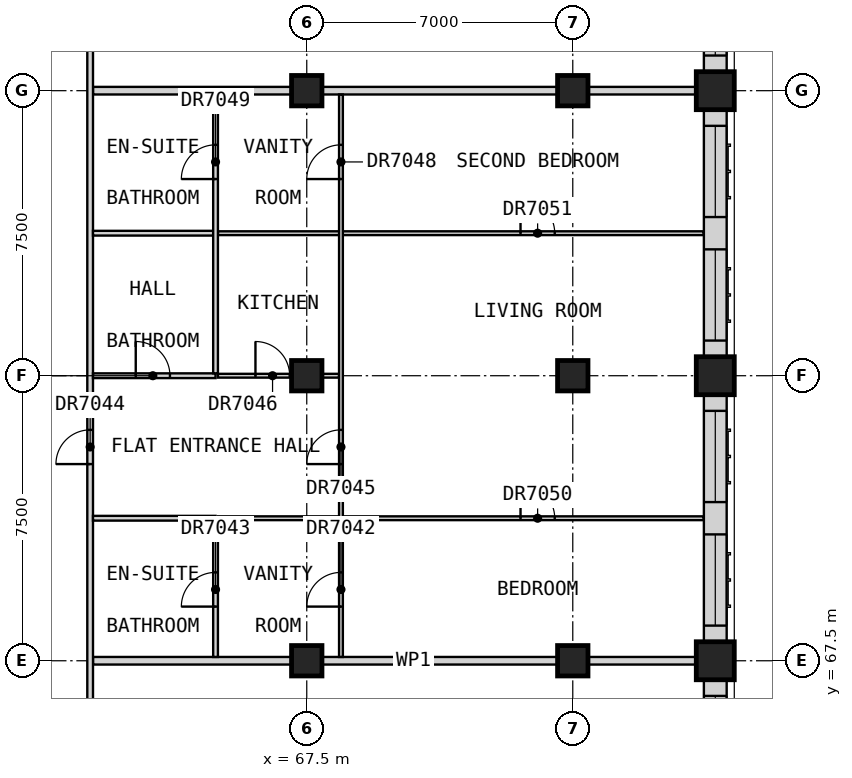
"""IFC4 building model, lengths in metres.
Left out: names, types, materials, properties, quantities, classifications, styles, units other than length and angle.
Written with IfcOpenShell. Run it as: python <this file> out.ifc"""

import sys

from ifc_helpers import new_model, si_unit, direction, frame, frame_2d, origin, origin_2d, place, context, subcontext, project, spatial, rectangle, extrude, element, fill, save


model = new_model("IFC4")
c1 = context("Model", 3, precision=1e-05, world=origin(), true_north=direction((0.0, 1.0)))
c2 = subcontext(c1, "Body", "Model", "MODEL_VIEW")
j1 = project(units=[si_unit("LENGTHUNIT", "METRE"), si_unit("PLANEANGLEUNIT", "RADIAN")], contexts=[c1])
p1 = place(None, origin())
s1 = spatial("IfcSite", under=j1, at=p1, CompositionType="ELEMENT")
p2 = place(p1, origin())
s2 = spatial("IfcBuilding", under=s1, at=p2, CompositionType="ELEMENT")
p3 = place(p2, frame((0.0, 0.0, 230.2)))
s3 = spatial("IfcBuildingStorey", under=s2, at=p3, CompositionType="ELEMENT", Elevation=230.2)
for number, where, z_axis, x_axis in (
    (1, (78.25, 67.5, 0.0), (0.0, 0.0, 1.0), (1.0, 0.0, 0.0)),
    (2, (78.25, 75.0, 0.0), (0.0, 0.0, 1.0), (1.0, 0.0, 0.0)),
    (3, (78.25, 82.5, 0.0), (0.0, 0.0, 1.0), (1.0, 0.0, 0.0)),
):
    element("IfcColumn", number, at=place(p3, frame(where, z_axis=z_axis, x_axis=x_axis)), inside=s3, PredefinedType="COLUMN", context=c2, shape_type="SweptSolid", body=[
        extrude(rectangle(XDim=1.0, YDim=1.0, at=origin_2d()), origin(), (0.0, 0.0, 1.0), 3.5),
    ])
for number, where, z_axis, x_axis in (
    (4, (67.5, 67.5, 0.0), (0.0, 0.0, 1.0), (1.0, 0.0, 0.0)),
    (5, (67.5, 75.0, 0.0), (0.0, 0.0, 1.0), (1.0, 0.0, 0.0)),
    (6, (67.5, 82.5, 0.0), (0.0, 0.0, 1.0), (1.0, 0.0, 0.0)),
    (7, (74.5, 67.5, 0.0), (0.0, 0.0, 1.0), (1.0, 0.0, 0.0)),
    (8, (74.5, 75.0, 0.0), (0.0, 0.0, 1.0), (1.0, 0.0, 0.0)),
    (9, (74.5, 82.5, 0.0), (0.0, 0.0, 1.0), (1.0, 0.0, 0.0)),
):
    element("IfcColumn", number, at=place(p3, frame(where, z_axis=z_axis, x_axis=x_axis)), inside=s3, PredefinedType="COLUMN", context=c2, shape_type="SweptSolid", body=[
        extrude(rectangle(XDim=0.8, YDim=0.8, at=origin_2d()), origin(), (0.0, 0.0, 1.0), 3.5),
    ])
p4 = place(p3, frame((78.25, 60.5, 0.0), z_axis=(0.0, 0.0, 1.0), x_axis=(0.0, 1.0, 0.0)))
e10 = element("IfcWall", 10, at=p4, inside=s3, PredefinedType="SOLIDWALL", context=c2, shape_type="SweptSolid", body=[
    extrude(rectangle(XDim=6.5, YDim=0.6, at=frame_2d((3.25, 0.0))), origin(), (0.0, 0.0, 1.0), 2.75),
])
p5 = place(p4, frame((0.425, 0.0, 0.8)))
e11 = element("IfcOpeningElement", 11, at=p5, cuts=e10, PredefinedType="OPENING", context=c2, shape_type="SweptSolid", body=[
    extrude(rectangle(XDim=2.4, YDim=1.8, at=frame_2d((1.2, 0.9))), frame((0.0, 0.31, 0.0), z_axis=(0.0, -1.0, 0.0), x_axis=(1.0, 0.0, 0.0)), (0.0, 0.0, 1.0), 0.62),
])
p6 = place(p4, frame((3.675, 0.0, 0.8)))
e12 = element("IfcOpeningElement", 12, at=p6, cuts=e10, PredefinedType="OPENING", context=c2, shape_type="SweptSolid", body=[
    extrude(rectangle(XDim=2.4, YDim=1.8, at=frame_2d((1.2, 0.9))), frame((0.0, 0.31, 0.0), z_axis=(0.0, -1.0, 0.0), x_axis=(1.0, 0.0, 0.0)), (0.0, 0.0, 1.0), 0.62),
])
p7 = place(p3, frame((78.25, 68.0, 0.0), z_axis=(0.0, 0.0, 1.0), x_axis=(0.0, 1.0, 0.0)))
e13 = element("IfcWall", 13, at=p7, inside=s3, PredefinedType="SOLIDWALL", context=c2, shape_type="SweptSolid", body=[
    extrude(rectangle(XDim=6.5, YDim=0.6, at=frame_2d((3.25, 0.0))), origin(), (0.0, 0.0, 1.0), 2.75),
])
p8 = place(p7, frame((0.425, 0.0, 0.8)))
e14 = element("IfcOpeningElement", 14, at=p8, cuts=e13, PredefinedType="OPENING", context=c2, shape_type="SweptSolid", body=[
    extrude(rectangle(XDim=2.4, YDim=1.8, at=frame_2d((1.2, 0.9))), frame((0.0, 0.31, 0.0), z_axis=(0.0, -1.0, 0.0), x_axis=(1.0, 0.0, 0.0)), (0.0, 0.0, 1.0), 0.62),
])
p9 = place(p7, frame((3.675, 0.0, 0.8)))
e15 = element("IfcOpeningElement", 15, at=p9, cuts=e13, PredefinedType="OPENING", context=c2, shape_type="SweptSolid", body=[
    extrude(rectangle(XDim=2.4, YDim=1.8, at=frame_2d((1.2, 0.9))), frame((0.0, 0.31, 0.0), z_axis=(0.0, -1.0, 0.0), x_axis=(1.0, 0.0, 0.0)), (0.0, 0.0, 1.0), 0.62),
])
p10 = place(p3, frame((78.25, 75.5, 0.0), z_axis=(0.0, 0.0, 1.0), x_axis=(0.0, 1.0, 0.0)))
e16 = element("IfcWall", 16, at=p10, inside=s3, PredefinedType="SOLIDWALL", context=c2, shape_type="SweptSolid", body=[
    extrude(rectangle(XDim=6.5, YDim=0.6, at=frame_2d((3.25, 0.0))), origin(), (0.0, 0.0, 1.0), 2.75),
])
p11 = place(p10, frame((0.425, 0.0, 0.8)))
e17 = element("IfcOpeningElement", 17, at=p11, cuts=e16, PredefinedType="OPENING", context=c2, shape_type="SweptSolid", body=[
    extrude(rectangle(XDim=2.4, YDim=1.8, at=frame_2d((1.2, 0.9))), frame((0.0, 0.31, 0.0), z_axis=(0.0, -1.0, 0.0), x_axis=(1.0, 0.0, 0.0)), (0.0, 0.0, 1.0), 0.62),
])
p12 = place(p10, frame((3.675, 0.0, 0.8)))
e18 = element("IfcOpeningElement", 18, at=p12, cuts=e16, PredefinedType="OPENING", context=c2, shape_type="SweptSolid", body=[
    extrude(rectangle(XDim=2.4, YDim=1.8, at=frame_2d((1.2, 0.9))), frame((0.0, 0.31, 0.0), z_axis=(0.0, -1.0, 0.0), x_axis=(1.0, 0.0, 0.0)), (0.0, 0.0, 1.0), 0.62),
])
p13 = place(p3, frame((78.25, 83.0, 0.0), z_axis=(0.0, 0.0, 1.0), x_axis=(0.0, 1.0, 0.0)))
e19 = element("IfcWall", 19, at=p13, inside=s3, PredefinedType="SOLIDWALL", context=c2, shape_type="SweptSolid", body=[
    extrude(rectangle(XDim=6.5, YDim=0.6, at=frame_2d((3.25, 0.0))), origin(), (0.0, 0.0, 1.0), 2.75),
])
p14 = place(p13, frame((0.425, 0.0, 0.8)))
e20 = element("IfcOpeningElement", 20, at=p14, cuts=e19, PredefinedType="OPENING", context=c2, shape_type="SweptSolid", body=[
    extrude(rectangle(XDim=2.4, YDim=1.8, at=frame_2d((1.2, 0.9))), frame((0.0, 0.31, 0.0), z_axis=(0.0, -1.0, 0.0), x_axis=(1.0, 0.0, 0.0)), (0.0, 0.0, 1.0), 0.62),
])
p15 = place(p13, frame((3.675, 0.0, 0.8)))
e21 = element("IfcOpeningElement", 21, at=p15, cuts=e19, PredefinedType="OPENING", context=c2, shape_type="SweptSolid", body=[
    extrude(rectangle(XDim=2.4, YDim=1.8, at=frame_2d((1.2, 0.9))), frame((0.0, 0.31, 0.0), z_axis=(0.0, -1.0, 0.0), x_axis=(1.0, 0.0, 0.0)), (0.0, 0.0, 1.0), 0.62),
])
for number, where, z_axis, x_axis in (
    (22, (61.875, 67.5, 0.0), (0.0, 0.0, 1.0), (1.0, 0.0, 0.0)),
    (23, (61.875, 82.5, 0.0), (0.0, 0.0, 1.0), (1.0, 0.0, 0.0)),
):
    element("IfcWall", number, at=place(p3, frame(where, z_axis=z_axis, x_axis=x_axis)), inside=s3, PredefinedType="PARTITIONING", context=c2, shape_type="SweptSolid", body=[
        extrude(rectangle(XDim=16.875, YDim=0.2, at=frame_2d((8.438, 0.0))), origin(), (0.0, 0.0, 1.0), 3.25),
    ])
p16 = place(p3, frame((61.8, 58.275, 0.0), z_axis=(0.0, 0.0, 1.0), x_axis=(0.0, 1.0, 0.0)))
e24 = element("IfcWall", 24, at=p16, inside=s3, PredefinedType="PARTITIONING", context=c2, shape_type="SweptSolid", body=[
    extrude(rectangle(XDim=25.95, YDim=0.15, at=frame_2d((12.975, 0.0))), origin(), (0.0, 0.0, 1.0), 3.25),
])
p17 = place(p16, frame((4.575, 0.0, 0.0)))
e25 = element("IfcOpeningElement", 25, at=p17, cuts=e24, PredefinedType="OPENING", context=c2, shape_type="SweptSolid", body=[
    extrude(rectangle(XDim=1.8, YDim=2.1, at=frame_2d((0.9, 1.05))), frame((0.0, 0.085, 0.0), z_axis=(0.0, -1.0, 0.0), x_axis=(1.0, 0.0, 0.0)), (0.0, 0.0, 1.0), 0.17),
])
p18 = place(p16, frame((14.4, 0.0, 0.0)))
e26 = element("IfcOpeningElement", 26, at=p18, cuts=e24, PredefinedType="OPENING", context=c2, shape_type="SweptSolid", body=[
    extrude(rectangle(XDim=0.9, YDim=2.1, at=frame_2d((0.45, 1.05))), frame((0.0, 0.085, 0.0), z_axis=(0.0, -1.0, 0.0), x_axis=(1.0, 0.0, 0.0)), (0.0, 0.0, 1.0), 0.17),
])
p19 = place(p3, frame((65.163, 71.25, 0.0), z_axis=(0.0, 0.0, 1.0), x_axis=(1.0, 0.0, 0.0)))
e27 = element("IfcWall", 27, at=p19, inside=s3, PredefinedType="PARTITIONING", context=c2, shape_type="SweptSolid", body=[
    extrude(rectangle(XDim=12.777, YDim=0.1, at=frame_2d((6.389, 0.0))), origin(), (0.0, 0.0, 1.0), 3.25),
])
p20 = place(p19, frame((7.962, 0.0, 0.0)))
e28 = element("IfcOpeningElement", 28, at=p20, cuts=e27, PredefinedType="OPENING", context=c2, shape_type="SweptSolid", body=[
    extrude(rectangle(XDim=0.9, YDim=2.1, at=frame_2d((0.45, 1.05))), frame((0.0, 0.06, 0.0), z_axis=(0.0, -1.0, 0.0), x_axis=(1.0, 0.0, 0.0)), (0.0, 0.0, 1.0), 0.12),
])
p21 = place(p3, frame((65.163, 75.0, 0.0), z_axis=(0.0, 0.0, 1.0), x_axis=(1.0, 0.0, 0.0)))
e29 = element("IfcWall", 29, at=p21, inside=s3, PredefinedType="PARTITIONING", context=c2, shape_type="SweptSolid", body=[
    extrude(rectangle(XDim=3.188, YDim=0.1, at=frame_2d((1.594, 0.0))), origin(), (0.0, 0.0, 1.0), 3.25),
])
p22 = place(p21, frame((0.988, 0.0, 0.0)))
e30 = element("IfcOpeningElement", 30, at=p22, cuts=e29, PredefinedType="OPENING", context=c2, shape_type="SweptSolid", body=[
    extrude(rectangle(XDim=0.9, YDim=2.1, at=frame_2d((0.45, 1.05))), frame((0.0, 0.06, 0.0), z_axis=(0.0, -1.0, 0.0), x_axis=(1.0, 0.0, 0.0)), (0.0, 0.0, 1.0), 0.12),
])
p23 = place(p3, frame((65.163, 78.75, 0.0), z_axis=(0.0, 0.0, 1.0), x_axis=(1.0, 0.0, 0.0)))
e31 = element("IfcWall", 31, at=p23, inside=s3, PredefinedType="PARTITIONING", context=c2, shape_type="SweptSolid", body=[
    extrude(rectangle(XDim=12.777, YDim=0.1, at=frame_2d((6.389, 0.0))), origin(), (0.0, 0.0, 1.0), 3.25),
])
p24 = place(p23, frame((7.962, 0.0, 0.0)))
e32 = element("IfcOpeningElement", 32, at=p24, cuts=e31, PredefinedType="OPENING", context=c2, shape_type="SweptSolid", body=[
    extrude(rectangle(XDim=0.9, YDim=2.1, at=frame_2d((0.45, 1.05))), frame((0.0, 0.06, 0.0), z_axis=(0.0, -1.0, 0.0), x_axis=(1.0, 0.0, 0.0)), (0.0, 0.0, 1.0), 0.12),
])
p25 = place(p3, frame((68.4, 67.6, 0.0), z_axis=(0.0, 0.0, 1.0), x_axis=(0.0, 1.0, 0.0)))
e33 = element("IfcWall", 33, at=p25, inside=s3, PredefinedType="PARTITIONING", context=c2, shape_type="SweptSolid", body=[
    extrude(rectangle(XDim=14.8, YDim=0.1, at=frame_2d((7.4, 0.0))), origin(), (0.0, 0.0, 1.0), 3.25),
])
p26 = place(p25, frame((1.325, 0.0, 0.0)))
e34 = element("IfcOpeningElement", 34, at=p26, cuts=e33, PredefinedType="OPENING", context=c2, shape_type="SweptSolid", body=[
    extrude(rectangle(XDim=0.9, YDim=2.1, at=frame_2d((0.45, 1.05))), frame((0.0, 0.06, 0.0), z_axis=(0.0, -1.0, 0.0), x_axis=(1.0, 0.0, 0.0)), (0.0, 0.0, 1.0), 0.12),
])
p27 = place(p25, frame((5.075, 0.0, 0.0)))
e35 = element("IfcOpeningElement", 35, at=p27, cuts=e33, PredefinedType="OPENING", context=c2, shape_type="SweptSolid", body=[
    extrude(rectangle(XDim=0.9, YDim=2.1, at=frame_2d((0.45, 1.05))), frame((0.0, 0.06, 0.0), z_axis=(0.0, -1.0, 0.0), x_axis=(1.0, 0.0, 0.0)), (0.0, 0.0, 1.0), 0.12),
])
p28 = place(p25, frame((12.575, 0.0, 0.0)))
e36 = element("IfcOpeningElement", 36, at=p28, cuts=e33, PredefinedType="OPENING", context=c2, shape_type="SweptSolid", body=[
    extrude(rectangle(XDim=0.9, YDim=2.1, at=frame_2d((0.45, 1.05))), frame((0.0, 0.06, 0.0), z_axis=(0.0, -1.0, 0.0), x_axis=(1.0, 0.0, 0.0)), (0.0, 0.0, 1.0), 0.12),
])
p29 = place(p3, frame((61.875, 71.25, 0.0), z_axis=(0.0, 0.0, 1.0), x_axis=(1.0, 0.0, 0.0)))
e37 = element("IfcWall", 37, at=p29, inside=s3, PredefinedType="PARTITIONING", context=c2, shape_type="SweptSolid", body=[
    extrude(rectangle(XDim=3.225, YDim=0.125, at=frame_2d((1.613, 0.0))), origin(), (0.0, 0.0, 1.0), 3.25),
])
p30 = place(p3, frame((61.875, 75.0, 0.0), z_axis=(0.0, 0.0, 1.0), x_axis=(1.0, 0.0, 0.0)))
e38 = element("IfcWall", 38, at=p30, inside=s3, PredefinedType="PARTITIONING", context=c2, shape_type="SweptSolid", body=[
    extrude(rectangle(XDim=3.225, YDim=0.125, at=frame_2d((1.613, 0.0))), origin(), (0.0, 0.0, 1.0), 3.25),
])
p31 = place(p30, frame((1.125, 0.0, 0.0)))
e39 = element("IfcOpeningElement", 39, at=p31, cuts=e38, PredefinedType="OPENING", context=c2, shape_type="SweptSolid", body=[
    extrude(rectangle(XDim=0.9, YDim=2.1, at=frame_2d((0.45, 1.05))), frame((0.0, 0.073, 0.0), z_axis=(0.0, -1.0, 0.0), x_axis=(1.0, 0.0, 0.0)), (0.0, 0.0, 1.0), 0.145),
])
p32 = place(p3, frame((61.875, 78.75, 0.0), z_axis=(0.0, 0.0, 1.0), x_axis=(1.0, 0.0, 0.0)))
e40 = element("IfcWall", 40, at=p32, inside=s3, PredefinedType="PARTITIONING", context=c2, shape_type="SweptSolid", body=[
    extrude(rectangle(XDim=3.163, YDim=0.125, at=frame_2d((1.581, 0.0))), origin(), (0.0, 0.0, 1.0), 3.25),
])
p33 = place(p3, frame((65.1, 67.6, 0.0), z_axis=(0.0, 0.0, 1.0), x_axis=(0.0, 1.0, 0.0)))
e41 = element("IfcWall", 41, at=p33, inside=s3, PredefinedType="PARTITIONING", context=c2, shape_type="SweptSolid", body=[
    extrude(rectangle(XDim=3.587, YDim=0.125, at=frame_2d((1.794, 0.0))), origin(), (0.0, 0.0, 1.0), 3.25),
])
p34 = place(p33, frame((1.325, 0.0, 0.0)))
e42 = element("IfcOpeningElement", 42, at=p34, cuts=e41, PredefinedType="OPENING", context=c2, shape_type="SweptSolid", body=[
    extrude(rectangle(XDim=0.9, YDim=2.1, at=frame_2d((0.45, 1.05))), frame((0.0, 0.073, 0.0), z_axis=(0.0, -1.0, 0.0), x_axis=(1.0, 0.0, 0.0)), (0.0, 0.0, 1.0), 0.145),
])
p35 = place(p3, frame((65.1, 75.062, 0.0), z_axis=(0.0, 0.0, 1.0), x_axis=(0.0, 1.0, 0.0)))
e43 = element("IfcWall", 43, at=p35, inside=s3, PredefinedType="PARTITIONING", context=c2, shape_type="SweptSolid", body=[
    extrude(rectangle(XDim=7.337, YDim=0.125, at=frame_2d((3.669, 0.0))), origin(), (0.0, 0.0, 1.0), 3.25),
])
p36 = place(p35, frame((5.113, 0.0, 0.0)))
e44 = element("IfcOpeningElement", 44, at=p36, cuts=e43, PredefinedType="OPENING", context=c2, shape_type="SweptSolid", body=[
    extrude(rectangle(XDim=0.9, YDim=2.1, at=frame_2d((0.45, 1.05))), frame((0.0, 0.073, 0.0), z_axis=(0.0, -1.0, 0.0), x_axis=(1.0, 0.0, 0.0)), (0.0, 0.0, 1.0), 0.145),
])
p37 = place(p6, origin())
e45 = element("IfcWindow", 45, at=p37, inside=s3, PartitioningType="SINGLE_PANEL", PredefinedType="WINDOW", context=c2, shape_type="SweptSolid", body=[
    extrude(rectangle(XDim=2.4, YDim=1.8, at=frame_2d((1.2, 0.9))), frame((0.0, -0.07, 0.0), z_axis=(0.0, -1.0, 0.0), x_axis=(1.0, 0.0, 0.0)), (0.0, 0.0, 1.0), 0.06),
])
fill(e12, e45)
p38 = place(p8, origin())
e46 = element("IfcWindow", 46, at=p38, inside=s3, PartitioningType="SINGLE_PANEL", PredefinedType="WINDOW", context=c2, shape_type="SweptSolid", body=[
    extrude(rectangle(XDim=2.4, YDim=1.8, at=frame_2d((1.2, 0.9))), frame((0.0, -0.07, 0.0), z_axis=(0.0, -1.0, 0.0), x_axis=(1.0, 0.0, 0.0)), (0.0, 0.0, 1.0), 0.06),
])
fill(e14, e46)
p39 = place(p9, origin())
e47 = element("IfcWindow", 47, at=p39, inside=s3, PartitioningType="SINGLE_PANEL", PredefinedType="WINDOW", context=c2, shape_type="SweptSolid", body=[
    extrude(rectangle(XDim=2.4, YDim=1.8, at=frame_2d((1.2, 0.9))), frame((0.0, -0.07, 0.0), z_axis=(0.0, -1.0, 0.0), x_axis=(1.0, 0.0, 0.0)), (0.0, 0.0, 1.0), 0.06),
])
fill(e15, e47)
p40 = place(p11, origin())
e48 = element("IfcWindow", 48, at=p40, inside=s3, PartitioningType="SINGLE_PANEL", PredefinedType="WINDOW", context=c2, shape_type="SweptSolid", body=[
    extrude(rectangle(XDim=2.4, YDim=1.8, at=frame_2d((1.2, 0.9))), frame((0.0, -0.07, 0.0), z_axis=(0.0, -1.0, 0.0), x_axis=(1.0, 0.0, 0.0)), (0.0, 0.0, 1.0), 0.06),
])
fill(e17, e48)
p41 = place(p12, origin())
e49 = element("IfcWindow", 49, at=p41, inside=s3, PartitioningType="SINGLE_PANEL", PredefinedType="WINDOW", context=c2, shape_type="SweptSolid", body=[
    extrude(rectangle(XDim=2.4, YDim=1.8, at=frame_2d((1.2, 0.9))), frame((0.0, -0.07, 0.0), z_axis=(0.0, -1.0, 0.0), x_axis=(1.0, 0.0, 0.0)), (0.0, 0.0, 1.0), 0.06),
])
fill(e18, e49)
p42 = place(p14, origin())
e50 = element("IfcWindow", 50, at=p42, inside=s3, PartitioningType="SINGLE_PANEL", PredefinedType="WINDOW", context=c2, shape_type="SweptSolid", body=[
    extrude(rectangle(XDim=2.4, YDim=1.8, at=frame_2d((1.2, 0.9))), frame((0.0, -0.07, 0.0), z_axis=(0.0, -1.0, 0.0), x_axis=(1.0, 0.0, 0.0)), (0.0, 0.0, 1.0), 0.06),
])
fill(e20, e50)
p43 = place(p26, origin())
e51 = element("IfcDoor", 51, at=p43, inside=s3, OperationType="SINGLE_SWING_LEFT", PredefinedType="DOOR", context=c2, shape_type="SweptSolid", body=[
    extrude(rectangle(XDim=0.9, YDim=2.1, at=frame_2d((0.45, 1.05))), frame((0.0, 0.025, 0.0), z_axis=(0.0, -1.0, 0.0), x_axis=(1.0, 0.0, 0.0)), (0.0, 0.0, 1.0), 0.05),
])
fill(e34, e51)
p44 = place(p34, origin())
e52 = element("IfcDoor", 52, at=p44, inside=s3, OperationType="SINGLE_SWING_LEFT", PredefinedType="DOOR", context=c2, shape_type="SweptSolid", body=[
    extrude(rectangle(XDim=0.9, YDim=2.1, at=frame_2d((0.45, 1.05))), frame((0.0, 0.025, 0.0), z_axis=(0.0, -1.0, 0.0), x_axis=(1.0, 0.0, 0.0)), (0.0, 0.0, 1.0), 0.05),
])
fill(e42, e52)
p45 = place(p18, origin())
e53 = element("IfcDoor", 53, at=p45, inside=s3, OperationType="SINGLE_SWING_RIGHT", PredefinedType="DOOR", context=c2, shape_type="SweptSolid", body=[
    extrude(rectangle(XDim=0.9, YDim=2.1, at=frame_2d((0.45, 1.05))), frame((0.0, 0.025, 0.0), z_axis=(0.0, -1.0, 0.0), x_axis=(1.0, 0.0, 0.0)), (0.0, 0.0, 1.0), 0.05),
])
fill(e26, e53)
p46 = place(p27, origin())
e54 = element("IfcDoor", 54, at=p46, inside=s3, OperationType="SINGLE_SWING_LEFT", PredefinedType="DOOR", context=c2, shape_type="SweptSolid", body=[
    extrude(rectangle(XDim=0.9, YDim=2.1, at=frame_2d((0.45, 1.05))), frame((0.0, 0.025, 0.0), z_axis=(0.0, -1.0, 0.0), x_axis=(1.0, 0.0, 0.0)), (0.0, 0.0, 1.0), 0.05),
])
fill(e35, e54)
p47 = place(p22, origin())
e55 = element("IfcDoor", 55, at=p47, inside=s3, OperationType="SINGLE_SWING_LEFT", PredefinedType="DOOR", context=c2, shape_type="SweptSolid", body=[
    extrude(rectangle(XDim=0.9, YDim=2.1, at=frame_2d((0.45, 1.05))), frame((0.0, 0.025, 0.0), z_axis=(0.0, -1.0, 0.0), x_axis=(1.0, 0.0, 0.0)), (0.0, 0.0, 1.0), 0.05),
])
fill(e30, e55)
p48 = place(p31, origin())
e56 = element("IfcDoor", 56, at=p48, inside=s3, OperationType="SINGLE_SWING_RIGHT", PredefinedType="DOOR", context=c2, shape_type="SweptSolid", body=[
    extrude(rectangle(XDim=0.9, YDim=2.1, at=frame_2d((0.45, 1.05))), frame((0.0, 0.025, 0.0), z_axis=(0.0, -1.0, 0.0), x_axis=(1.0, 0.0, 0.0)), (0.0, 0.0, 1.0), 0.05),
])
fill(e39, e56)
p49 = place(p28, origin())
e57 = element("IfcDoor", 57, at=p49, inside=s3, OperationType="SINGLE_SWING_LEFT", PredefinedType="DOOR", context=c2, shape_type="SweptSolid", body=[
    extrude(rectangle(XDim=0.9, YDim=2.1, at=frame_2d((0.45, 1.05))), frame((0.0, 0.025, 0.0), z_axis=(0.0, -1.0, 0.0), x_axis=(1.0, 0.0, 0.0)), (0.0, 0.0, 1.0), 0.05),
])
fill(e36, e57)
p50 = place(p36, origin())
e58 = element("IfcDoor", 58, at=p50, inside=s3, OperationType="SINGLE_SWING_LEFT", PredefinedType="DOOR", context=c2, shape_type="SweptSolid", body=[
    extrude(rectangle(XDim=0.9, YDim=2.1, at=frame_2d((0.45, 1.05))), frame((0.0, 0.025, 0.0), z_axis=(0.0, -1.0, 0.0), x_axis=(1.0, 0.0, 0.0)), (0.0, 0.0, 1.0), 0.05),
])
fill(e44, e58)
p51 = place(p20, origin())
e59 = element("IfcDoor", 59, at=p51, inside=s3, OperationType="SINGLE_SWING_LEFT", PredefinedType="DOOR", context=c2, shape_type="SweptSolid", body=[
    extrude(rectangle(XDim=0.9, YDim=2.1, at=frame_2d((0.45, 1.05))), frame((0.0, 0.025, 0.0), z_axis=(0.0, -1.0, 0.0), x_axis=(1.0, 0.0, 0.0)), (0.0, 0.0, 1.0), 0.05),
])
fill(e28, e59)
p52 = place(p24, origin())
e60 = element("IfcDoor", 60, at=p52, inside=s3, OperationType="SINGLE_SWING_LEFT", PredefinedType="DOOR", context=c2, shape_type="SweptSolid", body=[
    extrude(rectangle(XDim=0.9, YDim=2.1, at=frame_2d((0.45, 1.05))), frame((0.0, 0.025, 0.0), z_axis=(0.0, -1.0, 0.0), x_axis=(1.0, 0.0, 0.0)), (0.0, 0.0, 1.0), 0.05),
])
fill(e32, e60)
save(model, sys.argv[1])
